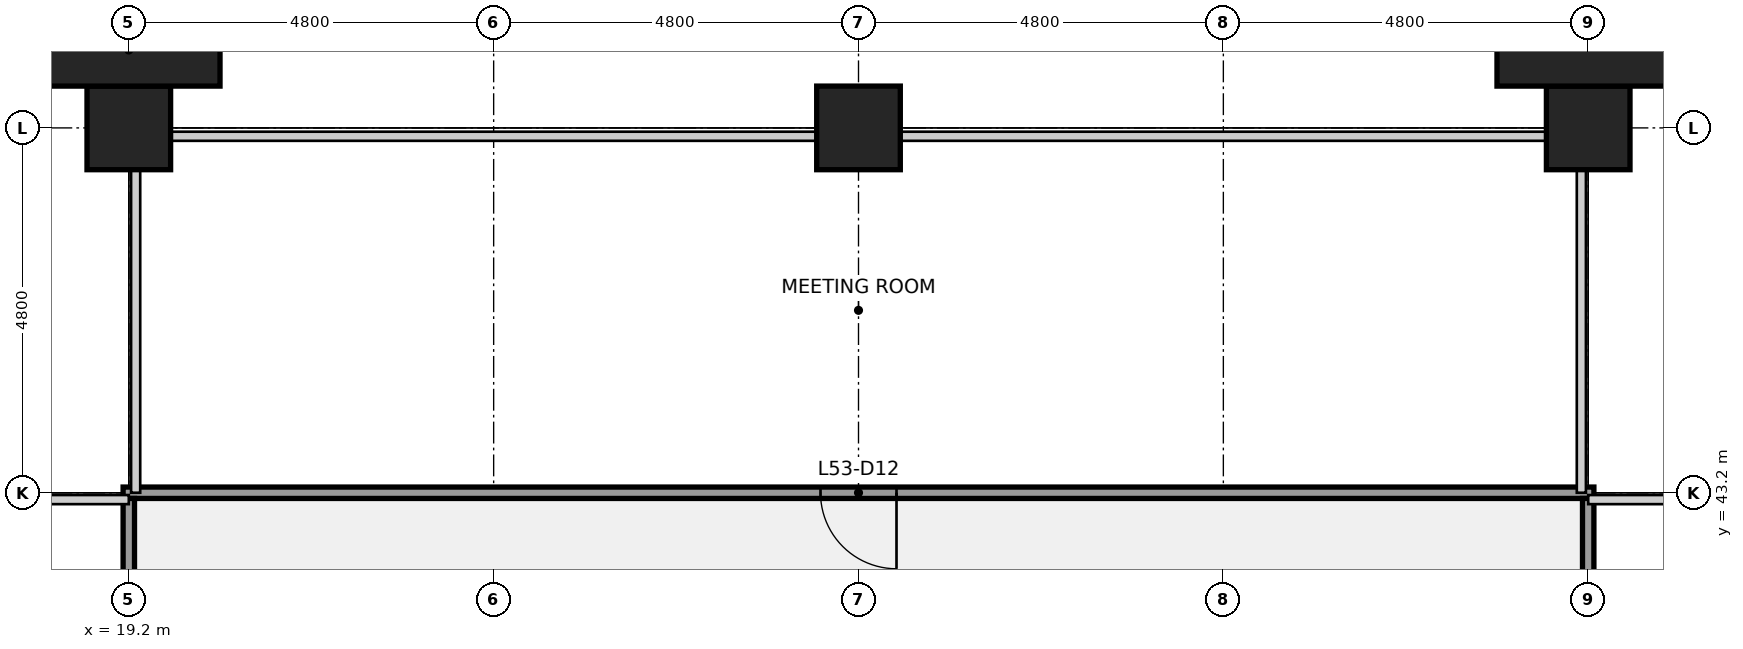
"""IFC4 building model, lengths in metres.
Left out: names, types, materials, properties, quantities, classifications, styles, units other than length and angle.
Written with IfcOpenShell. Run it as: python <this file> out.ifc"""

import sys

from ifc_helpers import new_model, si_unit, direction, frame, frame_2d, origin, origin_2d, place, context, subcontext, project, spatial, rectangle, extrude, element, fill, save


model = new_model("IFC4")
c1 = context("Model", 3, precision=1e-05, world=origin(), true_north=direction((0.0, 1.0)))
c2 = subcontext(c1, "Body", "Model", "MODEL_VIEW")
j1 = project(units=[si_unit("LENGTHUNIT", "METRE"), si_unit("PLANEANGLEUNIT", "RADIAN")], contexts=[c1])
p1 = place(None, origin())
s1 = spatial("IfcSite", under=j1, at=p1, CompositionType="ELEMENT")
p2 = place(p1, origin())
s2 = spatial("IfcBuilding", under=s1, at=p2, CompositionType="ELEMENT")
p3 = place(p2, frame((0.0, 0.0, 241.2)))
s3 = spatial("IfcBuildingStorey", under=s2, at=p3, CompositionType="ELEMENT", Elevation=241.2)
for number, where, z_axis, x_axis in (
    (1, (19.2, 48.0, 0.0), (0.0, 0.0, 1.0), (1.0, 0.0, 0.0)),
    (2, (28.8, 48.0, 0.0), (0.0, 0.0, 1.0), (1.0, 0.0, 0.0)),
    (3, (38.4, 48.0, 0.0), (0.0, 0.0, 1.0), (1.0, 0.0, 0.0)),
):
    element("IfcColumn", number, at=place(p3, frame(where, z_axis=z_axis, x_axis=x_axis)), inside=s3, PredefinedType="COLUMN", context=c2, shape_type="SweptSolid", body=[
        extrude(rectangle(XDim=1.1, YDim=1.1, at=origin_2d()), origin(), (0.0, 0.0, 1.0), 4.0),
    ])
p4 = place(p3, frame((19.125, 43.2, 0.0), z_axis=(0.0, 0.0, 1.0), x_axis=(1.0, 0.0, 0.0)))
e4 = element("IfcWall", 4, at=p4, inside=s3, PredefinedType="PARTITIONING", context=c2, shape_type="SweptSolid", body=[
    extrude(rectangle(XDim=19.35, YDim=0.15, at=frame_2d((9.675, 0.0))), origin(), (0.0, 0.0, 1.0), 2.849),
])
p5 = place(p4, frame((9.175, 0.0, 0.0)))
e5 = element("IfcOpeningElement", 5, at=p5, cuts=e4, PredefinedType="OPENING", context=c2, shape_type="SweptSolid", body=[
    extrude(rectangle(XDim=1.0, YDim=2.1, at=frame_2d((0.5, 1.05))), frame((0.0, 0.085, 0.0), z_axis=(0.0, -1.0, 0.0), x_axis=(1.0, 0.0, 0.0)), (0.0, 0.0, 1.0), 0.17),
])
for number, where, z_axis, x_axis in (
    (6, (19.2, 40.875, 0.0), (0.0, 0.0, 1.0), (0.0, 1.0, 0.0)),
    (7, (38.4, 40.875, 0.0), (0.0, 0.0, 1.0), (0.0, 1.0, 0.0)),
):
    element("IfcWall", number, at=place(p3, frame(where, z_axis=z_axis, x_axis=x_axis)), inside=s3, PredefinedType="PARTITIONING", context=c2, shape_type="SweptSolid", body=[
        extrude(rectangle(XDim=2.25, YDim=0.15, at=frame_2d((1.125, 0.0))), origin(), (0.0, 0.0, 1.0), 2.849),
    ])
for number, where, z_axis, x_axis in (
    (8, (19.2, 49.025, 0.0), (0.0, 0.0, 1.0), (1.0, 0.0, 0.0)),
    (9, (38.4, 49.025, 0.0), (0.0, 0.0, 1.0), (1.0, 0.0, 0.0)),
):
    element("IfcColumn", number, at=place(p3, frame(where, z_axis=z_axis, x_axis=x_axis)), inside=s3, PredefinedType="PILASTER", context=c2, shape_type="SweptSolid", body=[
        extrude(rectangle(XDim=2.4, YDim=0.95, at=origin_2d()), origin(), (0.0, 0.0, 1.0), 4.0),
    ])
p6 = place(p5, origin())
e10 = element("IfcDoor", 10, at=p6, inside=s3, OperationType="SINGLE_SWING_RIGHT", PredefinedType="DOOR", context=c2, shape_type="SweptSolid", body=[
    extrude(rectangle(XDim=1.0, YDim=2.1, at=frame_2d((0.5, 1.05))), frame((0.0, 0.025, 0.0), z_axis=(0.0, -1.0, 0.0), x_axis=(1.0, 0.0, 0.0)), (0.0, 0.0, 1.0), 0.05),
])
fill(e5, e10)
save(model, sys.argv[1])
